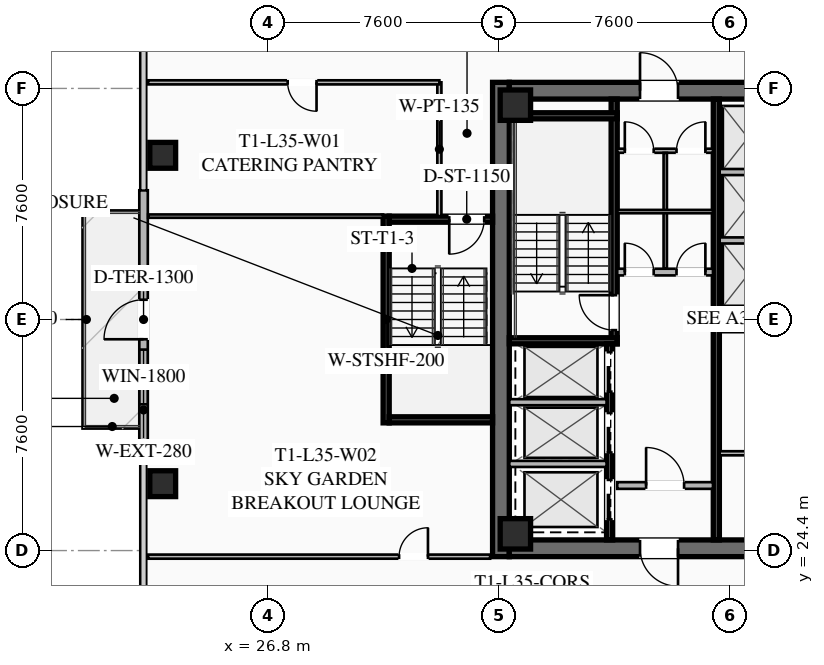
"""IFC4 building model, lengths in metres.
Left out: names, types, materials, properties, quantities, classifications, styles, units other than length and angle.
Written with IfcOpenShell. Run it as: python <this file> out.ifc"""

import sys

from ifc_helpers import new_model, si_unit, direction, frame, frame_2d, origin, origin_2d, place, context, subcontext, project, spatial, rectangle, hollow_rectangle, extrude, element, fill, save


model = new_model("IFC4")
c1 = context("Model", 3, precision=1e-05, world=origin(), true_north=direction((0.0, 1.0)))
c2 = subcontext(c1, "Body", "Model", "MODEL_VIEW")
j1 = project(units=[si_unit("LENGTHUNIT", "METRE"), si_unit("PLANEANGLEUNIT", "RADIAN")], contexts=[c1])
p1 = place(None, origin())
s1 = spatial("IfcSite", under=j1, at=p1, CompositionType="ELEMENT")
p2 = place(p1, origin())
s2 = spatial("IfcBuilding", under=s1, at=p2, CompositionType="ELEMENT")
p3 = place(p2, frame((0.0, 0.0, 132.15)))
s3 = spatial("IfcBuildingStorey", under=s2, at=p3, CompositionType="ELEMENT", Elevation=132.15)
p4 = place(p3, frame((34.475, 24.2, 0.0), z_axis=(0.0, 0.0, 1.0), x_axis=(0.0, 1.0, 0.0)))
e1 = element("IfcWall", 1, at=p4, inside=s3, PredefinedType="SHEAR", context=c2, shape_type="SweptSolid", body=[
    extrude(rectangle(XDim=15.6, YDim=0.55, at=frame_2d((7.8, 0.0))), origin(), (0.0, 0.0, 1.0), 3.55),
])
p5 = place(p3, frame((49.25, 24.475, 0.0), z_axis=(0.0, 0.0, 1.0), x_axis=(-1.0, 0.0, 0.0)))
e2 = element("IfcWall", 2, at=p5, inside=s3, PredefinedType="SHEAR", context=c2, shape_type="SweptSolid", body=[
    extrude(rectangle(XDim=14.5, YDim=0.55, at=frame_2d((7.25, 0.0))), origin(), (0.0, 0.0, 1.0), 3.55),
])
p6 = place(p5, frame((8.95, 0.0, 0.0)))
e3 = element("IfcOpeningElement", 3, at=p6, cuts=e2, PredefinedType="OPENING", context=c2, shape_type="SweptSolid", body=[
    extrude(rectangle(XDim=1.25, YDim=2.25, at=frame_2d((0.625, 1.125))), frame((0.0, 0.285, 0.0), z_axis=(0.0, -1.0, 0.0), x_axis=(1.0, 0.0, 0.0)), (0.0, 0.0, 1.0), 0.57),
])
p7 = place(p5, frame((3.9, 0.0, 0.0)))
e4 = element("IfcOpeningElement", 4, at=p7, cuts=e2, PredefinedType="OPENING", context=c2, shape_type="SweptSolid", body=[
    extrude(rectangle(XDim=1.25, YDim=2.25, at=frame_2d((0.625, 1.125))), frame((0.0, 0.285, 0.0), z_axis=(0.0, -1.0, 0.0), x_axis=(1.0, 0.0, 0.0)), (0.0, 0.0, 1.0), 0.57),
])
p8 = place(p3, frame((34.75, 39.525, 0.0), z_axis=(0.0, 0.0, 1.0), x_axis=(1.0, 0.0, 0.0)))
e5 = element("IfcWall", 5, at=p8, inside=s3, PredefinedType="SHEAR", context=c2, shape_type="SweptSolid", body=[
    extrude(rectangle(XDim=14.5, YDim=0.55, at=frame_2d((7.25, 0.0))), origin(), (0.0, 0.0, 1.0), 3.55),
])
p9 = place(p8, frame((4.3, 0.0, 0.0)))
e6 = element("IfcOpeningElement", 6, at=p9, cuts=e5, PredefinedType="OPENING", context=c2, shape_type="SweptSolid", body=[
    extrude(rectangle(XDim=1.25, YDim=2.25, at=frame_2d((0.625, 1.125))), frame((0.0, 0.285, 0.0), z_axis=(0.0, -1.0, 0.0), x_axis=(1.0, 0.0, 0.0)), (0.0, 0.0, 1.0), 0.57),
])
p10 = place(p8, frame((9.35, 0.0, 0.0)))
e7 = element("IfcOpeningElement", 7, at=p10, cuts=e5, PredefinedType="OPENING", context=c2, shape_type="SweptSolid", body=[
    extrude(rectangle(XDim=1.25, YDim=2.25, at=frame_2d((0.625, 1.125))), frame((0.0, 0.285, 0.0), z_axis=(0.0, -1.0, 0.0), x_axis=(1.0, 0.0, 0.0)), (0.0, 0.0, 1.0), 0.57),
])
for number, where, z_axis, x_axis in (
    (8, (34.95, 24.95, 0.0), (0.0, 0.0, 1.0), (1.0, 0.0, 0.0)),
    (9, (34.95, 39.05, 0.0), (0.0, 0.0, 1.0), (1.0, 0.0, 0.0)),
):
    element("IfcColumn", number, at=place(p3, frame(where, z_axis=z_axis, x_axis=x_axis)), inside=s3, PredefinedType="COLUMN", context=c2, shape_type="SweptSolid", body=[
        extrude(hollow_rectangle(XDim=1.0, YDim=1.0, WallThickness=0.04, at=origin_2d()), origin(), (0.0, 0.0, 1.0), 3.37),
    ])
for number, where, z_axis, x_axis in (
    (10, (23.35, 37.4, 0.0), (0.0, 0.0, 1.0), (1.0, 0.0, 0.0)),
    (11, (23.35, 26.6, 0.0), (0.0, 0.0, 1.0), (1.0, 0.0, 0.0)),
):
    element("IfcColumn", number, at=place(p3, frame(where, z_axis=z_axis, x_axis=x_axis)), inside=s3, PredefinedType="COLUMN", context=c2, shape_type="SweptSolid", body=[
        extrude(hollow_rectangle(XDim=0.85, YDim=0.85, WallThickness=0.035, at=origin_2d()), origin(), (0.0, 0.0, 1.0), 3.37),
    ])
p11 = place(p3, frame((22.72, 27.75, 0.0), z_axis=(0.0, 0.0, 1.0), x_axis=(0.0, 1.0, 0.0)))
e12 = element("IfcWall", 12, at=p11, inside=s3, PredefinedType="SOLIDWALL", context=c2, shape_type="SweptSolid", body=[
    extrude(rectangle(XDim=8.5, YDim=0.28, at=frame_2d((4.25, 0.0))), origin(), (0.0, 0.0, 1.0), 3.37),
])
p12 = place(p11, frame((3.6, 0.0, 0.0)))
e13 = element("IfcOpeningElement", 13, at=p12, cuts=e12, PredefinedType="OPENING", context=c2, shape_type="SweptSolid", body=[
    extrude(rectangle(XDim=1.3, YDim=2.15, at=frame_2d((0.65, 1.075))), frame((0.0, 0.15, 0.0), z_axis=(0.0, -1.0, 0.0), x_axis=(1.0, 0.0, 0.0)), (0.0, 0.0, 1.0), 0.3),
])
p13 = place(p11, frame((1.46, 0.0, 0.85)))
e14 = element("IfcOpeningElement", 14, at=p13, cuts=e12, PredefinedType="OPENING", context=c2, shape_type="SweptSolid", body=[
    extrude(rectangle(XDim=1.8, YDim=1.92, at=frame_2d((0.9, 0.96))), frame((0.0, 0.15, 0.0), z_axis=(0.0, -1.0, 0.0), x_axis=(1.0, 0.0, 0.0)), (0.0, 0.0, 1.0), 0.3),
])
p14 = place(p3, frame((38.2, 31.2, 0.0), z_axis=(0.0, 0.0, 1.0), x_axis=(0.0, 1.0, 0.0)))
e15 = element("IfcWall", 15, at=p14, inside=s3, PredefinedType="SHEAR", context=c2, shape_type="SweptSolid", body=[
    extrude(rectangle(XDim=8.05, YDim=0.2, at=frame_2d((4.025, 0.0))), origin(), (0.0, 0.0, 1.0), 3.37),
])
p15 = place(p14, frame((0.45, 0.0, 0.0)))
e16 = element("IfcOpeningElement", 16, at=p15, cuts=e15, PredefinedType="OPENING", context=c2, shape_type="SweptSolid", body=[
    extrude(rectangle(XDim=1.15, YDim=2.2, at=frame_2d((0.575, 1.1))), frame((0.0, 0.11, 0.0), z_axis=(0.0, -1.0, 0.0), x_axis=(1.0, 0.0, 0.0)), (0.0, 0.0, 1.0), 0.22),
])
for number, where, z_axis, x_axis in (
    (17, (34.75, 31.3, 0.0), (0.0, 0.0, 1.0), (1.0, 0.0, 0.0)),
    (18, (34.75, 38.7, 0.0), (0.0, 0.0, 1.0), (1.0, 0.0, 0.0)),
):
    element("IfcWall", number, at=place(p3, frame(where, z_axis=z_axis, x_axis=x_axis)), inside=s3, PredefinedType="SHEAR", context=c2, shape_type="SweptSolid", body=[
        extrude(rectangle(XDim=3.55, YDim=0.2, at=frame_2d((1.775, 0.0))), origin(), (0.0, 0.0, 1.0), 3.37),
    ])
p16 = place(p3, frame((41.56, 24.75, 0.0), z_axis=(0.0, 0.0, 1.0), x_axis=(0.0, 1.0, 0.0)))
e19 = element("IfcWall", 19, at=p16, inside=s3, PredefinedType="SHEAR", context=c2, shape_type="SweptSolid", body=[
    extrude(rectangle(XDim=14.5, YDim=0.2, at=frame_2d((7.25, 0.0))), origin(), (0.0, 0.0, 1.0), 3.37),
])
p17 = place(p3, frame((38.3, 33.56, 0.0), z_axis=(0.0, 0.0, 1.0), x_axis=(1.0, 0.0, 0.0)))
e20 = element("IfcWall", 20, at=p17, inside=s3, PredefinedType="SOLIDWALL", context=c2, shape_type="SweptSolid", body=[
    extrude(rectangle(XDim=3.15, YDim=0.22, at=frame_2d((1.575, 0.0))), origin(), (0.0, 0.0, 1.0), 2.723),
])
p18 = place(p17, frame((0.25, 0.0, 0.0)))
e21 = element("IfcOpeningElement", 21, at=p18, cuts=e20, PredefinedType="OPENING", context=c2, shape_type="SweptSolid", body=[
    extrude(rectangle(XDim=0.95, YDim=2.05, at=frame_2d((0.475, 1.025))), frame((0.0, 0.12, 0.0), z_axis=(0.0, -1.0, 0.0), x_axis=(1.0, 0.0, 0.0)), (0.0, 0.0, 1.0), 0.24),
])
p19 = place(p17, frame((1.95, 0.0, 0.0)))
e22 = element("IfcOpeningElement", 22, at=p19, cuts=e20, PredefinedType="OPENING", context=c2, shape_type="SweptSolid", body=[
    extrude(rectangle(XDim=0.95, YDim=2.05, at=frame_2d((0.475, 1.025))), frame((0.0, 0.12, 0.0), z_axis=(0.0, -1.0, 0.0), x_axis=(1.0, 0.0, 0.0)), (0.0, 0.0, 1.0), 0.24),
])
p20 = place(p3, frame((38.3, 26.54, 0.0), z_axis=(0.0, 0.0, 1.0), x_axis=(1.0, 0.0, 0.0)))
e23 = element("IfcWall", 23, at=p20, inside=s3, PredefinedType="SOLIDWALL", context=c2, shape_type="SweptSolid", body=[
    extrude(rectangle(XDim=3.15, YDim=0.22, at=frame_2d((1.575, 0.0))), origin(), (0.0, 0.0, 1.0), 2.723),
])
p21 = place(p20, frame((0.95, 0.0, 0.0)))
e24 = element("IfcOpeningElement", 24, at=p21, cuts=e23, PredefinedType="OPENING", context=c2, shape_type="SweptSolid", body=[
    extrude(rectangle(XDim=1.25, YDim=2.25, at=frame_2d((0.625, 1.125))), frame((0.0, 0.12, 0.0), z_axis=(0.0, -1.0, 0.0), x_axis=(1.0, 0.0, 0.0)), (0.0, 0.0, 1.0), 0.24),
])
p22 = place(p3, frame((38.05, 24.75, 0.0), z_axis=(0.0, 0.0, 1.0), x_axis=(0.0, 1.0, 0.0)))
e25 = element("IfcWall", 25, at=p22, inside=s3, PredefinedType="SHEAR", context=c2, shape_type="SweptSolid", body=[
    extrude(rectangle(XDim=6.45, YDim=0.2, at=frame_2d((3.225, 0.0))), origin(), (0.0, 0.0, 1.0), 3.37),
])
p23 = place(p22, frame((4.875, 0.0, 0.0)))
e26 = element("IfcOpeningElement", 26, at=p23, cuts=e25, PredefinedType="OPENING", context=c2, shape_type="SweptSolid", body=[
    extrude(rectangle(XDim=1.3, YDim=2.25, at=frame_2d((0.65, 1.125))), frame((0.0, 0.11, 0.0), z_axis=(0.0, -1.0, 0.0), x_axis=(1.0, 0.0, 0.0)), (0.0, 0.0, 1.0), 0.22),
])
p24 = place(p22, frame((2.875, 0.0, 0.0)))
e27 = element("IfcOpeningElement", 27, at=p24, cuts=e25, PredefinedType="OPENING", context=c2, shape_type="SweptSolid", body=[
    extrude(rectangle(XDim=1.3, YDim=2.25, at=frame_2d((0.65, 1.125))), frame((0.0, 0.11, 0.0), z_axis=(0.0, -1.0, 0.0), x_axis=(1.0, 0.0, 0.0)), (0.0, 0.0, 1.0), 0.22),
])
p25 = place(p22, frame((0.675, 0.0, 0.0)))
e28 = element("IfcOpeningElement", 28, at=p25, cuts=e25, PredefinedType="OPENING", context=c2, shape_type="SweptSolid", body=[
    extrude(rectangle(XDim=1.3, YDim=2.25, at=frame_2d((0.65, 1.125))), frame((0.0, 0.11, 0.0), z_axis=(0.0, -1.0, 0.0), x_axis=(1.0, 0.0, 0.0)), (0.0, 0.0, 1.0), 0.22),
])
for number, where, z_axis, x_axis in (
    (29, (34.75, 27.25, 0.0), (0.0, 0.0, 1.0), (1.0, 0.0, 0.0)),
    (30, (34.75, 29.28, 0.0), (0.0, 0.0, 1.0), (1.0, 0.0, 0.0)),
):
    element("IfcWall", number, at=place(p3, frame(where, z_axis=z_axis, x_axis=x_axis)), inside=s3, PredefinedType="SOLIDWALL", context=c2, shape_type="SweptSolid", body=[
        extrude(rectangle(XDim=3.2, YDim=0.2, at=frame_2d((1.6, 0.0))), origin(), (0.0, 0.0, 1.0), 3.37),
    ])
p26 = place(p3, frame((38.3, 37.55, 0.0), z_axis=(0.0, 0.0, 1.0), x_axis=(1.0, 0.0, 0.0)))
e31 = element("IfcWall", 31, at=p26, inside=s3, PredefinedType="PARTITIONING", context=c2, shape_type="SweptSolid", body=[
    extrude(rectangle(XDim=3.15, YDim=0.135, at=frame_2d((1.575, 0.0))), origin(), (0.0, 0.0, 1.0), 2.723),
])
p27 = place(p26, frame((0.25, 0.0, 0.0)))
e32 = element("IfcOpeningElement", 32, at=p27, cuts=e31, PredefinedType="OPENING", context=c2, shape_type="SweptSolid", body=[
    extrude(rectangle(XDim=0.95, YDim=2.05, at=frame_2d((0.475, 1.025))), frame((0.0, 0.077, 0.0), z_axis=(0.0, -1.0, 0.0), x_axis=(1.0, 0.0, 0.0)), (0.0, 0.0, 1.0), 0.155),
])
p28 = place(p26, frame((1.95, 0.0, 0.0)))
e33 = element("IfcOpeningElement", 33, at=p28, cuts=e31, PredefinedType="OPENING", context=c2, shape_type="SweptSolid", body=[
    extrude(rectangle(XDim=0.95, YDim=2.05, at=frame_2d((0.475, 1.025))), frame((0.0, 0.077, 0.0), z_axis=(0.0, -1.0, 0.0), x_axis=(1.0, 0.0, 0.0)), (0.0, 0.0, 1.0), 0.155),
])
p29 = place(p3, frame((39.88, 33.68, 0.0), z_axis=(0.0, 0.0, 1.0), x_axis=(0.0, 1.0, 0.0)))
e34 = element("IfcWall", 34, at=p29, inside=s3, PredefinedType="PARTITIONING", context=c2, shape_type="SweptSolid", body=[
    extrude(rectangle(XDim=3.8, YDim=0.11, at=frame_2d((1.9, 0.0))), origin(), (0.0, 0.0, 1.0), 2.723),
])
p30 = place(p3, frame((38.3, 35.55, 0.0), z_axis=(0.0, 0.0, 1.0), x_axis=(1.0, 0.0, 0.0)))
e35 = element("IfcWall", 35, at=p30, inside=s3, PredefinedType="PARTITIONING", context=c2, shape_type="SweptSolid", body=[
    extrude(rectangle(XDim=3.15, YDim=0.11, at=frame_2d((1.575, 0.0))), origin(), (0.0, 0.0, 1.0), 2.723),
])
for number, where, z_axis, x_axis in (
    (36, (41.67, 31.65, 0.0), (0.0, 0.0, 1.0), (1.0, 0.0, 0.0)),
    (37, (41.67, 27.6, 0.0), (0.0, 0.0, 1.0), (1.0, 0.0, 0.0)),
):
    element("IfcWall", number, at=place(p3, frame(where, z_axis=z_axis, x_axis=x_axis)), inside=s3, PredefinedType="PARTITIONING", context=c2, shape_type="SweptSolid", body=[
        extrude(rectangle(XDim=1.88, YDim=0.135, at=frame_2d((0.94, 0.0))), origin(), (0.0, 0.0, 1.0), 2.723),
    ])
for number, where, z_axis, x_axis in (
    (38, (41.67, 32.35, 0.0), (0.0, 0.0, 1.0), (1.0, 0.0, 0.0)),
    (39, (41.67, 34.6, 0.0), (0.0, 0.0, 1.0), (1.0, 0.0, 0.0)),
    (40, (41.67, 36.85, 0.0), (0.0, 0.0, 1.0), (1.0, 0.0, 0.0)),
):
    element("IfcWall", number, at=place(p3, frame(where, z_axis=z_axis, x_axis=x_axis)), inside=s3, PredefinedType="SOLIDWALL", context=c2, shape_type="SweptSolid", body=[
        extrude(rectangle(XDim=1.88, YDim=0.2, at=frame_2d((0.94, 0.0))), origin(), (0.0, 0.0, 1.0), 3.37),
    ])
p31 = place(p3, frame((30.7, 28.6, 0.0), z_axis=(0.0, 0.0, 1.0), x_axis=(0.0, 1.0, 0.0)))
e41 = element("IfcWall", 41, at=p31, inside=s3, PredefinedType="SHEAR", context=c2, shape_type="SweptSolid", body=[
    extrude(rectangle(XDim=6.8, YDim=0.2, at=frame_2d((3.4, 0.0))), origin(), (0.0, 0.0, 1.0), 3.37),
])
p32 = place(p3, frame((34.2, 35.3, 0.0), z_axis=(0.0, 0.0, 1.0), x_axis=(-1.0, 0.0, 0.0)))
e42 = element("IfcWall", 42, at=p32, inside=s3, PredefinedType="SHEAR", context=c2, shape_type="SweptSolid", body=[
    extrude(rectangle(XDim=3.4, YDim=0.2, at=frame_2d((1.7, 0.0))), origin(), (0.0, 0.0, 1.0), 3.37),
])
p33 = place(p32, frame((0.275, 0.0, 0.0)))
e43 = element("IfcOpeningElement", 43, at=p33, cuts=e42, PredefinedType="OPENING", context=c2, shape_type="SweptSolid", body=[
    extrude(rectangle(XDim=1.15, YDim=2.2, at=frame_2d((0.575, 1.1))), frame((0.0, 0.11, 0.0), z_axis=(0.0, -1.0, 0.0), x_axis=(1.0, 0.0, 0.0)), (0.0, 0.0, 1.0), 0.22),
])
p34 = place(p3, frame((30.8, 28.7, 0.0), z_axis=(0.0, 0.0, 1.0), x_axis=(1.0, 0.0, 0.0)))
e44 = element("IfcWall", 44, at=p34, inside=s3, PredefinedType="SHEAR", context=c2, shape_type="SweptSolid", body=[
    extrude(rectangle(XDim=3.4, YDim=0.2, at=frame_2d((1.7, 0.0))), origin(), (0.0, 0.0, 1.0), 3.37),
])
p35 = place(p3, frame((32.45, 35.4, 0.0), z_axis=(0.0, 0.0, 1.0), x_axis=(0.0, 1.0, 0.0)))
e45 = element("IfcWall", 45, at=p35, inside=s3, PredefinedType="PARTITIONING", context=c2, shape_type="SweptSolid", body=[
    extrude(rectangle(XDim=4.4, YDim=0.135, at=frame_2d((2.2, 0.0))), origin(), (0.0, 0.0, 1.0), 2.723),
])
p36 = place(p3, frame((32.45, 39.8, 0.0), z_axis=(0.0, 0.0, 1.0), x_axis=(-1.0, 0.0, 0.0)))
e46 = element("IfcWall", 46, at=p36, inside=s3, PredefinedType="PARTITIONING", context=c2, shape_type="SweptSolid", body=[
    extrude(rectangle(XDim=9.58, YDim=0.135, at=frame_2d((4.79, 0.0))), origin(), (0.0, 0.0, 1.0), 2.723),
])
p37 = place(p36, frame((4.04, 0.0, 0.0)))
e47 = element("IfcOpeningElement", 47, at=p37, cuts=e46, PredefinedType="OPENING", context=c2, shape_type="SweptSolid", body=[
    extrude(rectangle(XDim=0.95, YDim=2.05, at=frame_2d((0.475, 1.025))), frame((0.0, 0.077, 0.0), z_axis=(0.0, -1.0, 0.0), x_axis=(1.0, 0.0, 0.0)), (0.0, 0.0, 1.0), 0.155),
])
p38 = place(p3, frame((22.87, 24.2, 0.0), z_axis=(0.0, 0.0, 1.0), x_axis=(1.0, 0.0, 0.0)))
e48 = element("IfcWall", 48, at=p38, inside=s3, PredefinedType="PARTITIONING", context=c2, shape_type="SweptSolid", body=[
    extrude(rectangle(XDim=11.25, YDim=0.135, at=frame_2d((5.625, 0.0))), origin(), (0.0, 0.0, 1.0), 2.723),
])
p39 = place(p38, frame((8.255, 0.0, 0.0)))
e49 = element("IfcOpeningElement", 49, at=p39, cuts=e48, PredefinedType="OPENING", context=c2, shape_type="SweptSolid", body=[
    extrude(rectangle(XDim=0.95, YDim=2.05, at=frame_2d((0.475, 1.025))), frame((0.0, 0.077, 0.0), z_axis=(0.0, -1.0, 0.0), x_axis=(1.0, 0.0, 0.0)), (0.0, 0.0, 1.0), 0.155),
])
p40 = place(p3, frame((30.6, 35.4, 0.0), z_axis=(0.0, 0.0, 1.0), x_axis=(-1.0, 0.0, 0.0)))
e50 = element("IfcWall", 50, at=p40, inside=s3, PredefinedType="PARTITIONING", context=c2, shape_type="SweptSolid", body=[
    extrude(rectangle(XDim=7.73, YDim=0.11, at=frame_2d((3.865, 0.0))), origin(), (0.0, 0.0, 1.0), 2.723),
])
p41 = place(p12, origin())
e51 = element("IfcDoor", 51, at=p41, inside=s3, OperationType="SINGLE_SWING_LEFT", PredefinedType="DOOR", context=c2, shape_type="SweptSolid", body=[
    extrude(rectangle(XDim=1.3, YDim=2.15, at=frame_2d((0.65, 1.075))), frame((0.0, 0.025, 0.0), z_axis=(0.0, -1.0, 0.0), x_axis=(1.0, 0.0, 0.0)), (0.0, 0.0, 1.0), 0.05),
])
fill(e13, e51)
p42 = place(p13, origin())
e52 = element("IfcWindow", 52, at=p42, inside=s3, PartitioningType="SINGLE_PANEL", PredefinedType="WINDOW", context=c2, shape_type="SweptSolid", body=[
    extrude(rectangle(XDim=1.8, YDim=1.92, at=frame_2d((0.9, 0.96))), frame((0.0, 0.03, 0.0), z_axis=(0.0, -1.0, 0.0), x_axis=(1.0, 0.0, 0.0)), (0.0, 0.0, 1.0), 0.06),
])
fill(e14, e52)
p43 = place(p9, origin())
e53 = element("IfcDoor", 53, at=p43, inside=s3, OperationType="SINGLE_SWING_LEFT", PredefinedType="DOOR", context=c2, shape_type="SweptSolid", body=[
    extrude(rectangle(XDim=1.25, YDim=2.25, at=frame_2d((0.625, 1.125))), frame((0.0, 0.025, 0.0), z_axis=(0.0, -1.0, 0.0), x_axis=(1.0, 0.0, 0.0)), (0.0, 0.0, 1.0), 0.05),
])
fill(e6, e53)
p44 = place(p6, origin())
e54 = element("IfcDoor", 54, at=p44, inside=s3, OperationType="SINGLE_SWING_LEFT", PredefinedType="DOOR", context=c2, shape_type="SweptSolid", body=[
    extrude(rectangle(XDim=1.25, YDim=2.25, at=frame_2d((0.625, 1.125))), frame((0.0, 0.025, 0.0), z_axis=(0.0, -1.0, 0.0), x_axis=(1.0, 0.0, 0.0)), (0.0, 0.0, 1.0), 0.05),
])
fill(e3, e54)
p45 = place(p15, origin())
e55 = element("IfcDoor", 55, at=p45, inside=s3, OperationType="SINGLE_SWING_RIGHT", PredefinedType="DOOR", context=c2, shape_type="SweptSolid", body=[
    extrude(rectangle(XDim=1.15, YDim=2.2, at=frame_2d((0.575, 1.1))), frame((0.0, 0.025, 0.0), z_axis=(0.0, -1.0, 0.0), x_axis=(1.0, 0.0, 0.0)), (0.0, 0.0, 1.0), 0.05),
])
fill(e16, e55)
p46 = place(p21, origin())
e56 = element("IfcDoor", 56, at=p46, inside=s3, OperationType="SINGLE_SWING_LEFT", PredefinedType="DOOR", context=c2, shape_type="SweptSolid", body=[
    extrude(rectangle(XDim=1.25, YDim=2.25, at=frame_2d((0.625, 1.125))), frame((0.0, 0.025, 0.0), z_axis=(0.0, -1.0, 0.0), x_axis=(1.0, 0.0, 0.0)), (0.0, 0.0, 1.0), 0.05),
])
fill(e24, e56)
p47 = place(p27, origin())
e57 = element("IfcDoor", 57, at=p47, inside=s3, OperationType="SINGLE_SWING_LEFT", PredefinedType="DOOR", context=c2, shape_type="SweptSolid", body=[
    extrude(rectangle(XDim=0.95, YDim=2.05, at=frame_2d((0.475, 1.025))), frame((0.0, 0.025, 0.0), z_axis=(0.0, -1.0, 0.0), x_axis=(1.0, 0.0, 0.0)), (0.0, 0.0, 1.0), 0.05),
])
fill(e32, e57)
p48 = place(p28, origin())
e58 = element("IfcDoor", 58, at=p48, inside=s3, OperationType="SINGLE_SWING_RIGHT", PredefinedType="DOOR", context=c2, shape_type="SweptSolid", body=[
    extrude(rectangle(XDim=0.95, YDim=2.05, at=frame_2d((0.475, 1.025))), frame((0.0, 0.025, 0.0), z_axis=(0.0, -1.0, 0.0), x_axis=(1.0, 0.0, 0.0)), (0.0, 0.0, 1.0), 0.05),
])
fill(e33, e58)
p49 = place(p18, origin())
e59 = element("IfcDoor", 59, at=p49, inside=s3, OperationType="SINGLE_SWING_LEFT", PredefinedType="DOOR", context=c2, shape_type="SweptSolid", body=[
    extrude(rectangle(XDim=0.95, YDim=2.05, at=frame_2d((0.475, 1.025))), frame((0.0, 0.025, 0.0), z_axis=(0.0, -1.0, 0.0), x_axis=(1.0, 0.0, 0.0)), (0.0, 0.0, 1.0), 0.05),
])
fill(e21, e59)
p50 = place(p19, origin())
e60 = element("IfcDoor", 60, at=p50, inside=s3, OperationType="SINGLE_SWING_RIGHT", PredefinedType="DOOR", context=c2, shape_type="SweptSolid", body=[
    extrude(rectangle(XDim=0.95, YDim=2.05, at=frame_2d((0.475, 1.025))), frame((0.0, 0.025, 0.0), z_axis=(0.0, -1.0, 0.0), x_axis=(1.0, 0.0, 0.0)), (0.0, 0.0, 1.0), 0.05),
])
fill(e22, e60)
p51 = place(p33, origin())
e61 = element("IfcDoor", 61, at=p51, inside=s3, OperationType="SINGLE_SWING_RIGHT", PredefinedType="DOOR", context=c2, shape_type="SweptSolid", body=[
    extrude(rectangle(XDim=1.15, YDim=2.2, at=frame_2d((0.575, 1.1))), frame((0.0, 0.025, 0.0), z_axis=(0.0, -1.0, 0.0), x_axis=(1.0, 0.0, 0.0)), (0.0, 0.0, 1.0), 0.05),
])
fill(e43, e61)
p52 = place(p37, origin())
e62 = element("IfcDoor", 62, at=p52, inside=s3, OperationType="SINGLE_SWING_LEFT", PredefinedType="DOOR", context=c2, shape_type="SweptSolid", body=[
    extrude(rectangle(XDim=0.95, YDim=2.05, at=frame_2d((0.475, 1.025))), frame((0.0, 0.025, 0.0), z_axis=(0.0, -1.0, 0.0), x_axis=(1.0, 0.0, 0.0)), (0.0, 0.0, 1.0), 0.05),
])
fill(e47, e62)
p53 = place(p39, origin())
e63 = element("IfcDoor", 63, at=p53, inside=s3, OperationType="SINGLE_SWING_RIGHT", PredefinedType="DOOR", context=c2, shape_type="SweptSolid", body=[
    extrude(rectangle(XDim=0.95, YDim=2.05, at=frame_2d((0.475, 1.025))), frame((0.0, 0.025, 0.0), z_axis=(0.0, -1.0, 0.0), x_axis=(1.0, 0.0, 0.0)), (0.0, 0.0, 1.0), 0.05),
])
fill(e49, e63)
p54 = place(p23, origin())
e64 = element("IfcDoor", 64, at=p54, inside=s3, OperationType="SLIDING_TO_LEFT", PredefinedType="DOOR", context=c2, shape_type="SweptSolid", body=[
    extrude(rectangle(XDim=1.3, YDim=2.25, at=frame_2d((0.65, 1.125))), frame((0.0, 0.025, 0.0), z_axis=(0.0, -1.0, 0.0), x_axis=(1.0, 0.0, 0.0)), (0.0, 0.0, 1.0), 0.05),
])
fill(e26, e64)
p55 = place(p24, origin())
e65 = element("IfcDoor", 65, at=p55, inside=s3, OperationType="SLIDING_TO_LEFT", PredefinedType="DOOR", context=c2, shape_type="SweptSolid", body=[
    extrude(rectangle(XDim=1.3, YDim=2.25, at=frame_2d((0.65, 1.125))), frame((0.0, 0.025, 0.0), z_axis=(0.0, -1.0, 0.0), x_axis=(1.0, 0.0, 0.0)), (0.0, 0.0, 1.0), 0.05),
])
fill(e27, e65)
p56 = place(p25, origin())
e66 = element("IfcDoor", 66, at=p56, inside=s3, OperationType="SLIDING_TO_LEFT", PredefinedType="DOOR", context=c2, shape_type="SweptSolid", body=[
    extrude(rectangle(XDim=1.3, YDim=2.25, at=frame_2d((0.65, 1.125))), frame((0.0, 0.025, 0.0), z_axis=(0.0, -1.0, 0.0), x_axis=(1.0, 0.0, 0.0)), (0.0, 0.0, 1.0), 0.05),
])
fill(e28, e66)
save(model, sys.argv[1])
